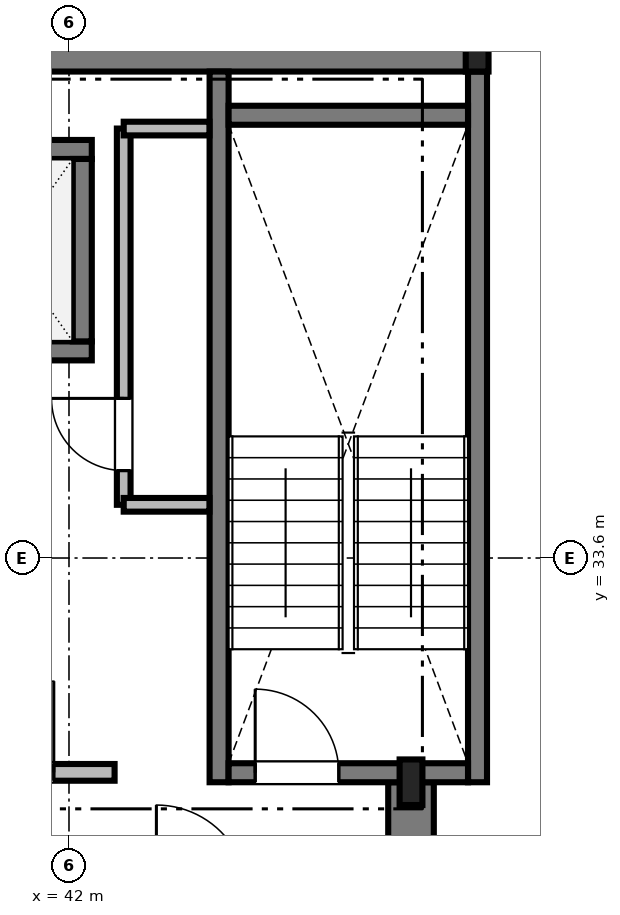
"""IFC4 building model, lengths in metres.
Left out: names, types, materials, properties, quantities, classifications, styles, units other than length and angle.
Written with IfcOpenShell. Run it as: python <this file> out.ifc"""

import sys

from ifc_helpers import new_model, si_unit, direction, frame, frame_2d, origin, origin_2d, place, context, subcontext, project, spatial, rectangle, i_section, extrude, source, transform, mapped, element, fill, save


model = new_model("IFC4")
c1 = context("Model", 3, precision=1e-05, world=origin(), true_north=direction((0.0, 1.0)))
c2 = subcontext(c1, "Body", "Model", "MODEL_VIEW")
j1 = project(units=[si_unit("LENGTHUNIT", "METRE"), si_unit("PLANEANGLEUNIT", "RADIAN")], contexts=[c1])
p1 = place(None, origin())
s1 = spatial("IfcSite", under=j1, at=p1, CompositionType="ELEMENT")
p2 = place(p1, origin())
s2 = spatial("IfcBuilding", under=s1, at=p2, CompositionType="ELEMENT")
p3 = place(p2, frame((0.0, 0.0, 262.45)))
s3 = spatial("IfcBuildingStorey", under=s2, at=p3, CompositionType="ELEMENT", Elevation=262.45)
m1 = source(origin(), c2, "Body", "SweptSolid", [
    extrude(rectangle(XDim=17.52, YDim=0.6, at=frame_2d((8.76, 0.0))), origin(), (0.0, 0.0, 1.0), 3.65),
])
p4 = place(p3, frame((29.85, 40.3, 0.0), z_axis=(0.0, 0.0, 1.0), x_axis=(1.0, 0.0, 0.0)))
e1 = element("IfcWall", 1, at=p4, inside=s3, PredefinedType="SHEAR", context=c2, shape_type="MappedRepresentation", body=[
    mapped(m1, transform((0.0, 0.0, 0.0), scale=1.0)),
])
m2 = source(origin(), c2, "Body", "SweptSolid", [
    extrude(rectangle(XDim=13.15, YDim=0.6, at=frame_2d((6.575, 0.0))), origin(), (0.0, 0.0, 1.0), 3.65),
])
p5 = place(p3, frame((46.5, 17.5, 0.0), z_axis=(0.0, 0.0, 1.0), x_axis=(0.0, 1.0, 0.0)))
e2 = element("IfcWall", 2, at=p5, inside=s3, PredefinedType="SHEAR", context=c2, shape_type="MappedRepresentation", body=[
    mapped(m2, transform((0.0, 0.0, 0.0), scale=1.0)),
])
m3 = source(origin(), c2, "Body", "SweptSolid", [
    extrude(i_section(OverallWidth=0.3, OverallDepth=0.6, WebThickness=0.015, FlangeThickness=0.03, FilletRadius=0.027, at=origin_2d()), origin(), (0.0, 0.0, 1.0), 3.65),
])
for number, where, z_axis, x_axis in (
    (3, (46.5, 30.65, 0.0), (0.0, 0.0, 1.0), (1.0, 0.0, 0.0)),
    (4, (47.37, 40.3, 0.0), (0.0, 0.0, 1.0), (1.0, 0.0, 0.0)),
):
    element("IfcColumn", number, at=place(p3, frame(where, z_axis=z_axis, x_axis=x_axis)), inside=s3, PredefinedType="COLUMN", context=c2, shape_type="MappedRepresentation", body=[
        mapped(m3, transform((0.0, 0.0, 0.0), scale=1.0)),
    ])
m4 = source(origin(), c2, "Body", "SweptSolid", [
    extrude(rectangle(XDim=9.35, YDim=0.25, at=frame_2d((4.675, 0.0))), origin(), (0.0, 0.0, 1.0), 3.75),
])
for number, where, z_axis, x_axis in (
    (5, (43.975, 30.65, 0.0), (0.0, 0.0, 1.0), (0.0, 1.0, 0.0)),
    (6, (47.375, 30.65, 0.0), (0.0, 0.0, 1.0), (0.0, 1.0, 0.0)),
):
    element("IfcWall", number, at=place(p3, frame(where, z_axis=z_axis, x_axis=x_axis)), inside=s3, PredefinedType="SOLIDWALL", context=c2, shape_type="MappedRepresentation", body=[
        mapped(m4, transform((0.0, 0.0, 0.0), scale=1.0)),
    ])
m5 = source(origin(), c2, "Body", "SweptSolid", [
    extrude(rectangle(XDim=3.15, YDim=0.25, at=frame_2d((1.575, 0.0))), origin(), (0.0, 0.0, 1.0), 3.75),
])
p6 = place(p3, frame((44.1, 39.425, 0.0), z_axis=(0.0, 0.0, 1.0), x_axis=(1.0, 0.0, 0.0)))
e7 = element("IfcWall", 7, at=p6, inside=s3, PredefinedType="SOLIDWALL", context=c2, shape_type="MappedRepresentation", body=[
    mapped(m5, transform((0.0, 0.0, 0.0), scale=1.0)),
])
p7 = place(p3, frame((44.1, 30.775, 0.0), z_axis=(0.0, 0.0, 1.0), x_axis=(1.0, 0.0, 0.0)))
e8 = element("IfcWall", 8, at=p7, inside=s3, PredefinedType="SOLIDWALL", context=c2, shape_type="MappedRepresentation", body=[
    mapped(m5, transform((0.0, 0.0, 0.0), scale=1.0)),
])
m6 = source(origin(), c2, "Body", "SweptSolid", [
    extrude(rectangle(XDim=1.1, YDim=2.2, at=frame_2d((0.55, 1.1))), frame((0.0, 0.135, 0.0), z_axis=(0.0, -1.0, 0.0), x_axis=(1.0, 0.0, 0.0)), (0.0, 0.0, 1.0), 0.27),
])
p8 = place(p7, frame((0.35, 0.0, 0.0)))
e9 = element("IfcOpeningElement", 9, at=p8, cuts=e8, PredefinedType="OPENING", context=c2, shape_type="MappedRepresentation", body=[
    mapped(m6, transform((0.0, 0.0, 0.0), scale=1.0)),
])
m7 = source(origin(), c2, "Body", "SweptSolid", [
    extrude(rectangle(XDim=2.8, YDim=0.22, at=frame_2d((1.4, 0.0))), origin(), (0.0, 0.0, 1.0), 3.65),
])
p9 = place(p3, frame((39.8, 30.78, 0.0), z_axis=(0.0, 0.0, 1.0), x_axis=(1.0, 0.0, 0.0)))
e10 = element("IfcWall", 10, at=p9, inside=s3, PredefinedType="SOLIDWALL", context=c2, shape_type="MappedRepresentation", body=[
    mapped(m7, transform((0.0, 0.0, 0.0), scale=1.0)),
])
m8 = source(origin(), c2, "Body", "SweptSolid", [
    extrude(rectangle(XDim=1.2, YDim=2.2, at=frame_2d((0.6, 1.1))), frame((0.0, 0.12, 0.0), z_axis=(0.0, -1.0, 0.0), x_axis=(1.0, 0.0, 0.0)), (0.0, 0.0, 1.0), 0.24),
])
p10 = place(p9, frame((0.8, 0.0, 0.0)))
e11 = element("IfcOpeningElement", 11, at=p10, cuts=e10, PredefinedType="OPENING", context=c2, shape_type="MappedRepresentation", body=[
    mapped(m8, transform((0.0, 0.0, 0.0), scale=1.0)),
])
m9 = source(origin(), c2, "Body", "SweptSolid", [
    extrude(rectangle(XDim=2.55, YDim=0.25, at=frame_2d((1.275, 0.0))), origin(), (0.0, 0.0, 1.0), 3.65),
])
p11 = place(p3, frame((39.75, 36.325, 0.0), z_axis=(0.0, 0.0, 1.0), x_axis=(1.0, 0.0, 0.0)))
e12 = element("IfcWall", 12, at=p11, inside=s3, PredefinedType="SOLIDWALL", context=c2, shape_type="MappedRepresentation", body=[
    mapped(m9, transform((0.0, 0.0, 0.0), scale=1.0)),
])
m10 = source(origin(), c2, "Body", "SweptSolid", [
    extrude(rectangle(XDim=1.2, YDim=2.25, at=frame_2d((0.6, 1.125))), frame((0.0, 0.135, 0.0), z_axis=(0.0, -1.0, 0.0), x_axis=(1.0, 0.0, 0.0)), (0.0, 0.0, 1.0), 0.27),
])
p12 = place(p11, frame((0.675, 0.0, 0.0)))
e13 = element("IfcOpeningElement", 13, at=p12, cuts=e12, PredefinedType="OPENING", context=c2, shape_type="MappedRepresentation", body=[
    mapped(m10, transform((0.0, 0.0, 0.0), scale=1.0)),
])
p13 = place(p3, frame((39.75, 38.975, 0.0), z_axis=(0.0, 0.0, 1.0), x_axis=(1.0, 0.0, 0.0)))
e14 = element("IfcWall", 14, at=p13, inside=s3, PredefinedType="SOLIDWALL", context=c2, shape_type="MappedRepresentation", body=[
    mapped(m9, transform((0.0, 0.0, 0.0), scale=1.0)),
])
m11 = source(origin(), c2, "Body", "SweptSolid", [
    extrude(rectangle(XDim=2.4, YDim=0.25, at=frame_2d((1.2, 0.0))), origin(), (0.0, 0.0, 1.0), 3.65),
])
p14 = place(p3, frame((42.175, 36.45, 0.0), z_axis=(0.0, 0.0, 1.0), x_axis=(0.0, 1.0, 0.0)))
e15 = element("IfcWall", 15, at=p14, inside=s3, PredefinedType="SOLIDWALL", context=c2, shape_type="MappedRepresentation", body=[
    mapped(m11, transform((0.0, 0.0, 0.0), scale=1.0)),
])
m12 = source(origin(), c2, "Body", "SweptSolid", [
    extrude(rectangle(XDim=4.95, YDim=0.18, at=frame_2d((2.475, 0.0))), origin(), (0.0, 0.0, 1.0), 3.65),
])
p15 = place(p3, frame((42.72, 34.3, 0.0), z_axis=(0.0, 0.0, 1.0), x_axis=(0.0, 1.0, 0.0)))
e16 = element("IfcWall", 16, at=p15, inside=s3, PredefinedType="PARTITIONING", context=c2, shape_type="MappedRepresentation", body=[
    mapped(m12, transform((0.0, 0.0, 0.0), scale=1.0)),
])
m13 = source(origin(), c2, "Body", "SweptSolid", [
    extrude(rectangle(XDim=0.95, YDim=2.15, at=frame_2d((0.475, 1.075))), frame((0.0, 0.1, 0.0), z_axis=(0.0, -1.0, 0.0), x_axis=(1.0, 0.0, 0.0)), (0.0, 0.0, 1.0), 0.2),
])
p16 = place(p15, frame((0.45, 0.0, 0.0)))
e17 = element("IfcOpeningElement", 17, at=p16, cuts=e16, PredefinedType="OPENING", context=c2, shape_type="MappedRepresentation", body=[
    mapped(m13, transform((0.0, 0.0, 0.0), scale=1.0)),
])
m14 = source(origin(), c2, "Body", "SweptSolid", [
    extrude(rectangle(XDim=1.128, YDim=0.18, at=frame_2d((0.564, 0.0))), origin(), (0.0, 0.0, 1.0), 3.65),
])
for number, where, z_axis, x_axis in (
    (18, (42.72, 34.3, 0.0), (0.0, 0.0, 1.0), (1.0, 0.0, 0.0)),
    (19, (42.72, 39.25, 0.0), (0.0, 0.0, 1.0), (1.0, 0.0, 0.0)),
):
    element("IfcWall", number, at=place(p3, frame(where, z_axis=z_axis, x_axis=x_axis)), inside=s3, PredefinedType="PARTITIONING", context=c2, shape_type="MappedRepresentation", body=[
        mapped(m14, transform((0.0, 0.0, 0.0), scale=1.0)),
    ])
m15 = source(origin(), c2, "Body", "SweptSolid", [
    extrude(rectangle(XDim=1.1, YDim=2.2, at=frame_2d((0.55, 1.1))), frame((0.0, 0.025, 0.0), z_axis=(0.0, -1.0, 0.0), x_axis=(1.0, 0.0, 0.0)), (0.0, 0.0, 1.0), 0.05),
])
p17 = place(p8, origin())
e20 = element("IfcDoor", 20, at=p17, inside=s3, OperationType="SINGLE_SWING_LEFT", PredefinedType="DOOR", context=c2, shape_type="MappedRepresentation", body=[
    mapped(m15, transform((0.0, 0.0, 0.0), scale=1.0)),
])
fill(e9, e20)
m16 = source(origin(), c2, "Body", "SweptSolid", [
    extrude(rectangle(XDim=1.2, YDim=2.2, at=frame_2d((0.6, 1.1))), frame((0.0, 0.025, 0.0), z_axis=(0.0, -1.0, 0.0), x_axis=(1.0, 0.0, 0.0)), (0.0, 0.0, 1.0), 0.05),
])
p18 = place(p10, origin())
e21 = element("IfcDoor", 21, at=p18, inside=s3, OperationType="SINGLE_SWING_RIGHT", PredefinedType="DOOR", context=c2, shape_type="MappedRepresentation", body=[
    mapped(m16, transform((0.0, 0.0, 0.0), scale=1.0)),
])
fill(e11, e21)
m17 = source(origin(), c2, "Body", "SweptSolid", [
    extrude(rectangle(XDim=0.95, YDim=2.15, at=frame_2d((0.475, 1.075))), frame((0.0, 0.025, 0.0), z_axis=(0.0, -1.0, 0.0), x_axis=(1.0, 0.0, 0.0)), (0.0, 0.0, 1.0), 0.05),
])
p19 = place(p16, origin())
e22 = element("IfcDoor", 22, at=p19, inside=s3, OperationType="SINGLE_SWING_RIGHT", PredefinedType="DOOR", context=c2, shape_type="MappedRepresentation", body=[
    mapped(m17, transform((0.0, 0.0, 0.0), scale=1.0)),
])
fill(e17, e22)
save(model, sys.argv[1])
